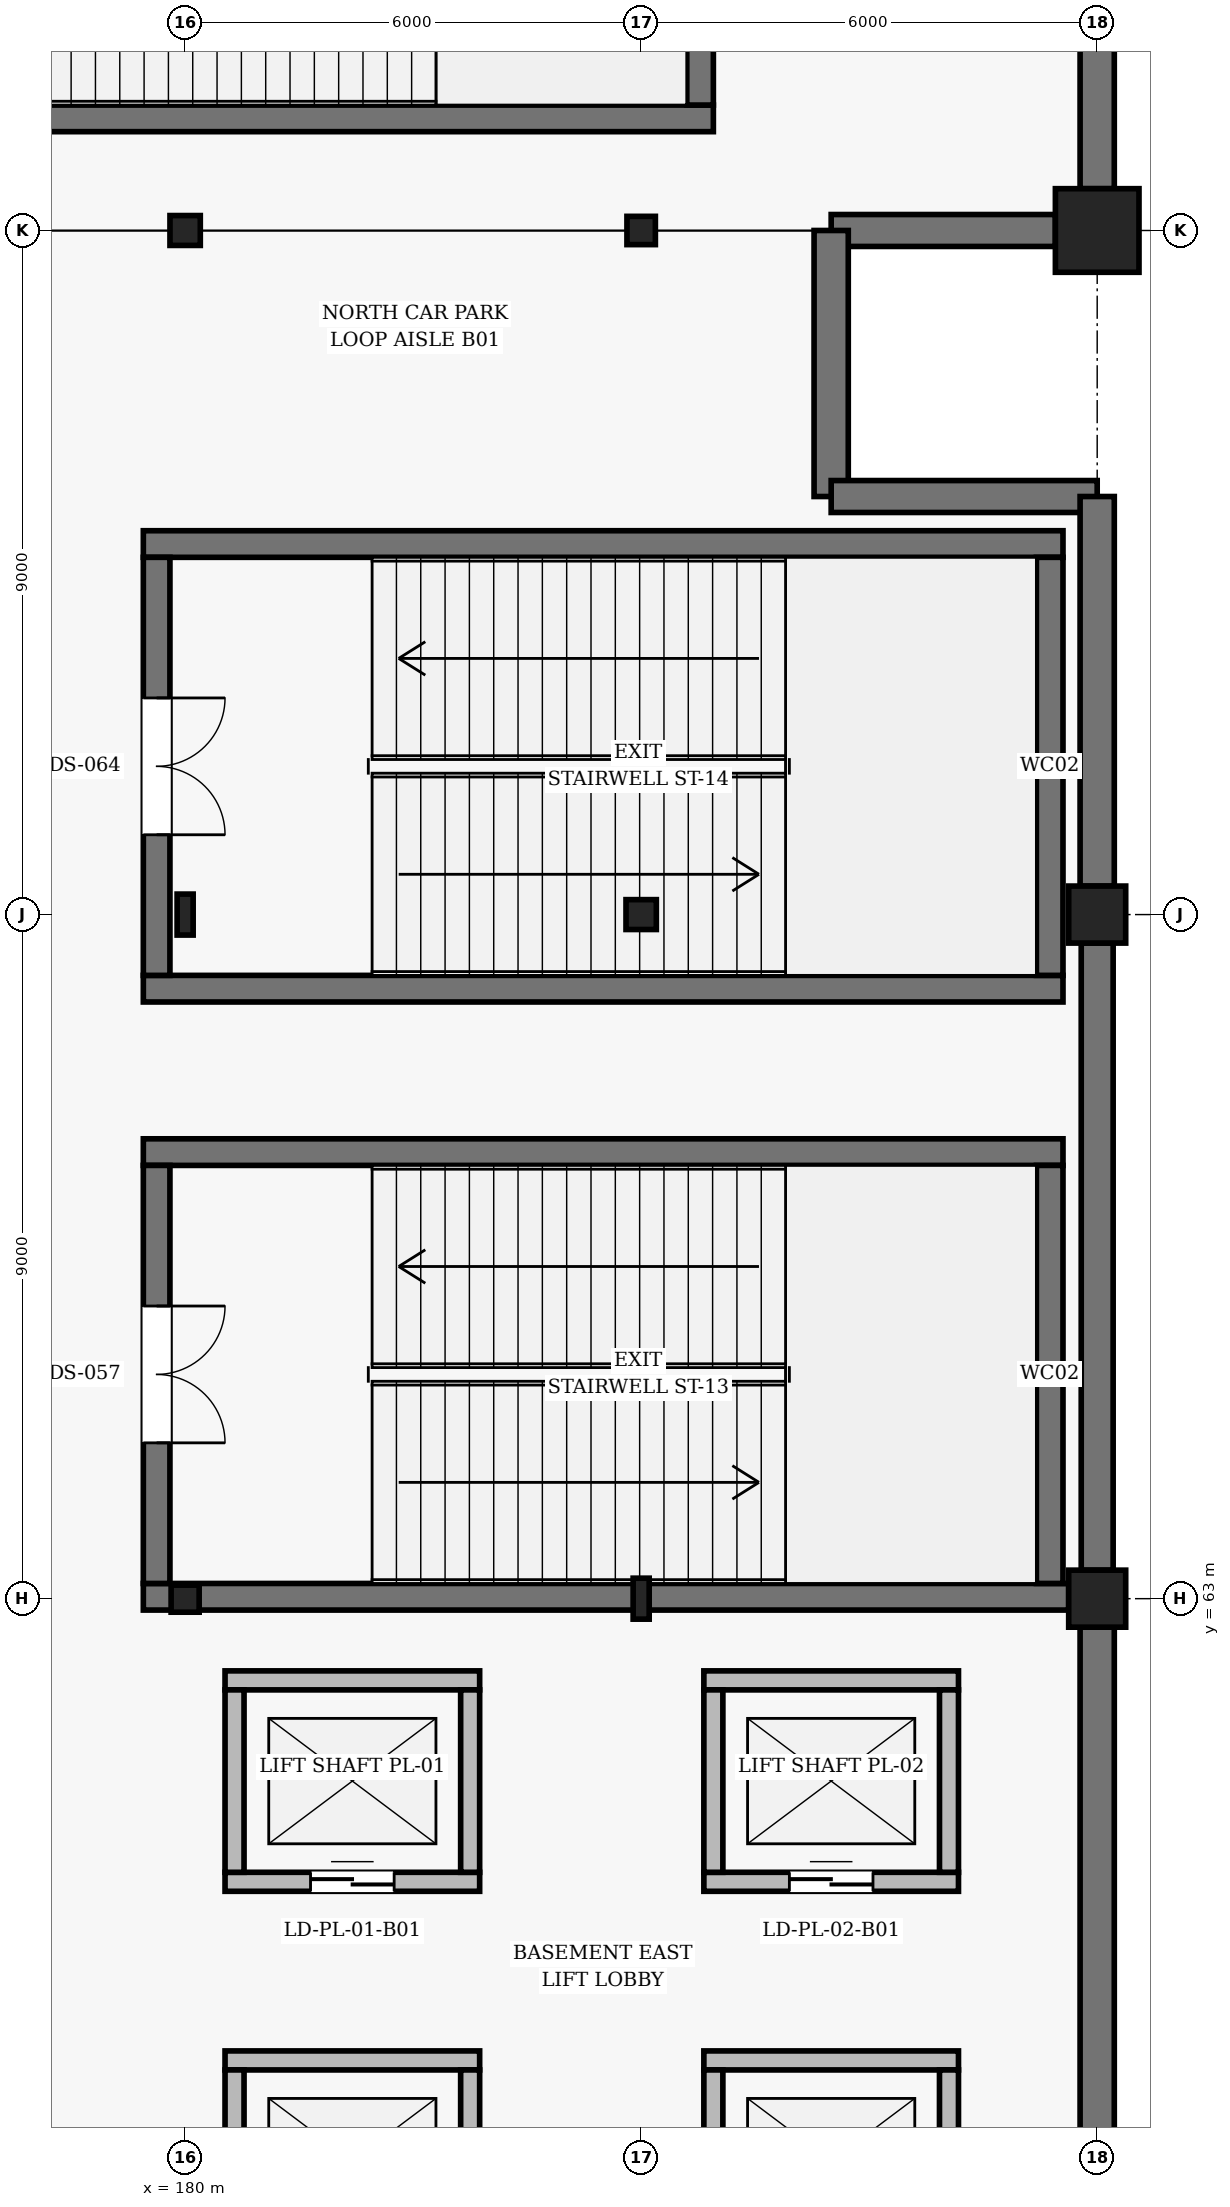
"""IFC4 building model, lengths in metres.
Left out: names, types, materials, properties, quantities, classifications, styles, units other than length and angle.
Written with IfcOpenShell. Run it as: python <this file> out.ifc"""

import sys

from ifc_helpers import new_model, si_unit, direction, frame, frame_2d, origin, origin_2d, place, context, subcontext, project, spatial, rectangle, i_section, extrude, element, fill, save


model = new_model("IFC4")
c1 = context("Model", 3, precision=1e-05, world=origin(), true_north=direction((0.0, 1.0)))
c2 = subcontext(c1, "Body", "Model", "MODEL_VIEW")
j1 = project(units=[si_unit("LENGTHUNIT", "METRE"), si_unit("PLANEANGLEUNIT", "RADIAN")], contexts=[c1])
p1 = place(None, origin())
s1 = spatial("IfcSite", under=j1, at=p1, CompositionType="ELEMENT")
p2 = place(p1, origin())
s2 = spatial("IfcBuilding", under=s1, at=p2, CompositionType="ELEMENT")
p3 = place(p2, frame((0.0, 0.0, -5.4)))
s3 = spatial("IfcBuildingStorey", under=s2, at=p3, CompositionType="ELEMENT", Elevation=-5.4)
p4 = place(p3, frame((180.0, 63.0, 0.0), z_axis=(0.0, 0.0, 1.0), x_axis=(1.0, 0.0, 0.0)))
e1 = element("IfcColumn", 1, at=p4, inside=s3, PredefinedType="COLUMN", context=c2, shape_type="SweptSolid", body=[
    extrude(i_section(OverallWidth=0.369, OverallDepth=0.356, WebThickness=0.011, FlangeThickness=0.018, FilletRadius=0.015, at=origin_2d()), origin(), (0.0, 0.0, 1.0), 5.4),
])
p5 = place(p3, frame((180.0, 72.0, 0.0), z_axis=(0.0, 0.0, 1.0), x_axis=(1.0, 0.0, 0.0)))
e2 = element("IfcColumn", 2, at=p5, inside=s3, PredefinedType="COLUMN", context=c2, shape_type="SweptSolid", body=[
    extrude(i_section(OverallWidth=0.211, OverallDepth=0.539, WebThickness=0.012, FlangeThickness=0.019, FilletRadius=0.014, at=origin_2d()), origin(), (0.0, 0.0, 1.0), 5.4),
])
p6 = place(p3, frame((180.0, 81.0, 0.0), z_axis=(0.0, 0.0, 1.0), x_axis=(1.0, 0.0, 0.0)))
e3 = element("IfcColumn", 3, at=p6, inside=s3, PredefinedType="COLUMN", context=c2, shape_type="SweptSolid", body=[
    extrude(i_section(OverallWidth=0.399, OverallDepth=0.393, WebThickness=0.023, FlangeThickness=0.037, FilletRadius=0.018, at=origin_2d()), origin(), (0.0, 0.0, 1.0), 5.4),
])
p7 = place(p3, frame((186.0, 63.0, 0.0), z_axis=(0.0, 0.0, 1.0), x_axis=(1.0, 0.0, 0.0)))
e4 = element("IfcColumn", 4, at=p7, inside=s3, PredefinedType="COLUMN", context=c2, shape_type="SweptSolid", body=[
    extrude(i_section(OverallWidth=0.211, OverallDepth=0.539, WebThickness=0.012, FlangeThickness=0.019, FilletRadius=0.014, at=origin_2d()), origin(), (0.0, 0.0, 1.0), 5.4),
])
p8 = place(p3, frame((186.0, 72.0, 0.0), z_axis=(0.0, 0.0, 1.0), x_axis=(1.0, 0.0, 0.0)))
e5 = element("IfcColumn", 5, at=p8, inside=s3, PredefinedType="COLUMN", context=c2, shape_type="SweptSolid", body=[
    extrude(i_section(OverallWidth=0.399, OverallDepth=0.393, WebThickness=0.023, FlangeThickness=0.037, FilletRadius=0.018, at=origin_2d()), origin(), (0.0, 0.0, 1.0), 5.4),
])
p9 = place(p3, frame((186.0, 81.0, 0.0), z_axis=(0.0, 0.0, 1.0), x_axis=(1.0, 0.0, 0.0)))
e6 = element("IfcColumn", 6, at=p9, inside=s3, PredefinedType="COLUMN", context=c2, shape_type="SweptSolid", body=[
    extrude(i_section(OverallWidth=0.374, OverallDepth=0.372, WebThickness=0.016, FlangeThickness=0.026, FilletRadius=0.016, at=origin_2d()), origin(), (0.0, 0.0, 1.0), 5.4),
])
for number, where, z_axis, x_axis in (
    (7, (192.0, 63.0, 0.0), (0.0, 0.0, 1.0), (1.0, 0.0, 0.0)),
    (8, (192.0, 72.0, 0.0), (0.0, 0.0, 1.0), (1.0, 0.0, 0.0)),
):
    element("IfcColumn", number, at=place(p3, frame(where, z_axis=z_axis, x_axis=x_axis)), inside=s3, PredefinedType="COLUMN", context=c2, shape_type="SweptSolid", body=[
        extrude(rectangle(XDim=0.75, YDim=0.75, at=origin_2d()), origin(), (0.0, 0.0, 1.0), 5.4),
    ])
p10 = place(p3, frame((192.0, 81.0, 0.0), z_axis=(0.0, 0.0, 1.0), x_axis=(1.0, 0.0, 0.0)))
e9 = element("IfcColumn", 9, at=p10, inside=s3, PredefinedType="COLUMN", context=c2, shape_type="SweptSolid", body=[
    extrude(rectangle(XDim=1.1, YDim=1.1, at=origin_2d()), origin(), (0.0, 0.0, 1.0), 5.4),
])
p11 = place(p3, frame((192.0, 89.625, 0.0), z_axis=(0.0, 0.0, 1.0), x_axis=(0.0, -1.0, 0.0)))
e10 = element("IfcWall", 10, at=p11, inside=s3, PredefinedType="USERDEFINED", context=c2, shape_type="SweptSolid", body=[
    extrude(rectangle(XDim=8.075, YDim=0.45, at=frame_2d((4.038, 0.0))), origin(), (0.0, 0.0, 1.0), 4.566),
])
p12 = place(p3, frame((191.45, 81.0, 0.0), z_axis=(0.0, 0.0, 1.0), x_axis=(-1.0, 0.0, 0.0)))
e11 = element("IfcWall", 11, at=p12, inside=s3, PredefinedType="USERDEFINED", context=c2, shape_type="SweptSolid", body=[
    extrude(rectangle(XDim=2.95, YDim=0.42, at=frame_2d((1.475, 0.0))), origin(), (0.0, 0.0, 1.0), 4.332),
])
p13 = place(p3, frame((188.5, 81.0, 0.0), z_axis=(0.0, 0.0, 1.0), x_axis=(0.0, -1.0, 0.0)))
e12 = element("IfcWall", 12, at=p13, inside=s3, PredefinedType="USERDEFINED", context=c2, shape_type="SweptSolid", body=[
    extrude(rectangle(XDim=3.5, YDim=0.45, at=frame_2d((1.75, 0.0))), origin(), (0.0, 0.0, 1.0), 5.05),
])
p14 = place(p3, frame((188.5, 77.5, 0.0), z_axis=(0.0, 0.0, 1.0), x_axis=(1.0, 0.0, 0.0)))
e13 = element("IfcWall", 13, at=p14, inside=s3, PredefinedType="USERDEFINED", context=c2, shape_type="SweptSolid", body=[
    extrude(rectangle(XDim=3.5, YDim=0.42, at=frame_2d((1.75, 0.0))), origin(), (0.0, 0.0, 1.0), 5.05),
])
p15 = place(p3, frame((192.0, 77.5, 0.0), z_axis=(0.0, 0.0, 1.0), x_axis=(0.0, -1.0, 0.0)))
e14 = element("IfcWall", 14, at=p15, inside=s3, PredefinedType="USERDEFINED", context=c2, shape_type="SweptSolid", body=[
    extrude(rectangle(XDim=5.125, YDim=0.45, at=frame_2d((2.562, 0.0))), origin(), (0.0, 0.0, 1.0), 4.825),
])
p16 = place(p3, frame((192.0, 71.625, 0.0), z_axis=(0.0, 0.0, 1.0), x_axis=(0.0, -1.0, 0.0)))
e15 = element("IfcWall", 15, at=p16, inside=s3, PredefinedType="USERDEFINED", context=c2, shape_type="SweptSolid", body=[
    extrude(rectangle(XDim=8.25, YDim=0.42, at=frame_2d((4.125, 0.0))), origin(), (0.0, 0.0, 1.0), 4.659),
])
p17 = place(p3, frame((192.0, 62.625, 0.0), z_axis=(0.0, 0.0, 1.0), x_axis=(0.0, -1.0, 0.0)))
e16 = element("IfcWall", 16, at=p17, inside=s3, PredefinedType="USERDEFINED", context=c2, shape_type="SweptSolid", body=[
    extrude(rectangle(XDim=8.25, YDim=0.45, at=frame_2d((4.125, 0.0))), origin(), (0.0, 0.0, 1.0), 4.586),
])
p18 = place(p3, frame((179.45, 63.025, 0.0), z_axis=(0.0, 0.0, 1.0), x_axis=(1.0, 0.0, 0.0)))
e17 = element("IfcWall", 17, at=p18, inside=s3, PredefinedType="SHEAR", context=c2, shape_type="SweptSolid", body=[
    extrude(rectangle(XDim=12.175, YDim=0.35, at=frame_2d((6.087, 0.0))), origin(), (0.0, 0.0, 1.0), 5.14),
])
p19 = place(p3, frame((191.55, 68.875, 0.0), z_axis=(0.0, 0.0, 1.0), x_axis=(-1.0, 0.0, 0.0)))
e18 = element("IfcWall", 18, at=p19, inside=s3, PredefinedType="SHEAR", context=c2, shape_type="SweptSolid", body=[
    extrude(rectangle(XDim=12.1, YDim=0.35, at=frame_2d((6.05, 0.0))), origin(), (0.0, 0.0, 1.0), 5.14),
])
p20 = place(p3, frame((179.625, 68.7, 0.0), z_axis=(0.0, 0.0, 1.0), x_axis=(0.0, -1.0, 0.0)))
e19 = element("IfcWall", 19, at=p20, inside=s3, PredefinedType="SHEAR", context=c2, shape_type="SweptSolid", body=[
    extrude(rectangle(XDim=5.5, YDim=0.35, at=frame_2d((2.75, 0.0))), origin(), (0.0, 0.0, 1.0), 5.14),
])
p21 = place(p20, frame((1.85, 0.0, 0.0)))
e20 = element("IfcOpeningElement", 20, at=p21, cuts=e19, PredefinedType="OPENING", context=c2, shape_type="SweptSolid", body=[
    extrude(rectangle(XDim=1.8, YDim=2.2, at=frame_2d((0.9, 1.1))), frame((0.0, 0.185, 0.0), z_axis=(0.0, -1.0, 0.0), x_axis=(1.0, 0.0, 0.0)), (0.0, 0.0, 1.0), 0.37),
])
p22 = place(p3, frame((191.375, 63.2, 0.0), z_axis=(0.0, 0.0, 1.0), x_axis=(0.0, 1.0, 0.0)))
e21 = element("IfcWall", 21, at=p22, inside=s3, PredefinedType="SHEAR", context=c2, shape_type="SweptSolid", body=[
    extrude(rectangle(XDim=5.5, YDim=0.35, at=frame_2d((2.75, 0.0))), origin(), (0.0, 0.0, 1.0), 5.14),
])
for number, where, z_axis, x_axis in (
    (22, (179.45, 71.025, 0.0), (0.0, 0.0, 1.0), (1.0, 0.0, 0.0)),
    (23, (191.55, 76.875, 0.0), (0.0, 0.0, 1.0), (-1.0, 0.0, 0.0)),
):
    element("IfcWall", number, at=place(p3, frame(where, z_axis=z_axis, x_axis=x_axis)), inside=s3, PredefinedType="SHEAR", context=c2, shape_type="SweptSolid", body=[
        extrude(rectangle(XDim=12.1, YDim=0.35, at=frame_2d((6.05, 0.0))), origin(), (0.0, 0.0, 1.0), 5.14),
    ])
p23 = place(p3, frame((179.625, 76.7, 0.0), z_axis=(0.0, 0.0, 1.0), x_axis=(0.0, -1.0, 0.0)))
e24 = element("IfcWall", 24, at=p23, inside=s3, PredefinedType="SHEAR", context=c2, shape_type="SweptSolid", body=[
    extrude(rectangle(XDim=5.5, YDim=0.35, at=frame_2d((2.75, 0.0))), origin(), (0.0, 0.0, 1.0), 5.14),
])
p24 = place(p23, frame((1.85, 0.0, 0.0)))
e25 = element("IfcOpeningElement", 25, at=p24, cuts=e24, PredefinedType="OPENING", context=c2, shape_type="SweptSolid", body=[
    extrude(rectangle(XDim=1.8, YDim=2.2, at=frame_2d((0.9, 1.1))), frame((0.0, 0.185, 0.0), z_axis=(0.0, -1.0, 0.0), x_axis=(1.0, 0.0, 0.0)), (0.0, 0.0, 1.0), 0.37),
])
p25 = place(p3, frame((191.375, 71.2, 0.0), z_axis=(0.0, 0.0, 1.0), x_axis=(0.0, 1.0, 0.0)))
e26 = element("IfcWall", 26, at=p25, inside=s3, PredefinedType="SHEAR", context=c2, shape_type="SweptSolid", body=[
    extrude(rectangle(XDim=5.5, YDim=0.35, at=frame_2d((2.75, 0.0))), origin(), (0.0, 0.0, 1.0), 5.14),
])
p26 = place(p3, frame((174.85, 82.475, 0.0), z_axis=(0.0, 0.0, 1.0), x_axis=(1.0, 0.0, 0.0)))
e27 = element("IfcWall", 27, at=p26, inside=s3, PredefinedType="SHEAR", context=c2, shape_type="SweptSolid", body=[
    extrude(rectangle(XDim=12.1, YDim=0.35, at=frame_2d((6.05, 0.0))), origin(), (0.0, 0.0, 1.0), 5.12),
])
p27 = place(p3, frame((186.775, 82.65, 0.0), z_axis=(0.0, 0.0, 1.0), x_axis=(0.0, 1.0, 0.0)))
e28 = element("IfcWall", 28, at=p27, inside=s3, PredefinedType="SHEAR", context=c2, shape_type="SweptSolid", body=[
    extrude(rectangle(XDim=5.5, YDim=0.35, at=frame_2d((2.75, 0.0))), origin(), (0.0, 0.0, 1.0), 5.12),
])
p28 = place(p3, frame((180.525, 59.275, 0.0), z_axis=(0.0, 0.0, 1.0), x_axis=(1.0, 0.0, 0.0)))
e29 = element("IfcWall", 29, at=p28, inside=s3, PredefinedType="SOLIDWALL", context=c2, shape_type="SweptSolid", body=[
    extrude(rectangle(XDim=3.35, YDim=0.25, at=frame_2d((1.675, 0.0))), origin(), (0.0, 0.0, 1.0), 5.1),
])
p29 = place(p28, frame((1.125, 0.0, 0.0)))
e30 = element("IfcOpeningElement", 30, at=p29, cuts=e29, PredefinedType="OPENING", context=c2, shape_type="SweptSolid", body=[
    extrude(rectangle(XDim=1.1, YDim=2.2, at=frame_2d((0.55, 1.1))), frame((0.0, 0.135, 0.0), z_axis=(0.0, -1.0, 0.0), x_axis=(1.0, 0.0, 0.0)), (0.0, 0.0, 1.0), 0.27),
])
p30 = place(p3, frame((183.875, 61.925, 0.0), z_axis=(0.0, 0.0, 1.0), x_axis=(-1.0, 0.0, 0.0)))
e31 = element("IfcWall", 31, at=p30, inside=s3, PredefinedType="SOLIDWALL", context=c2, shape_type="SweptSolid", body=[
    extrude(rectangle(XDim=3.35, YDim=0.25, at=frame_2d((1.675, 0.0))), origin(), (0.0, 0.0, 1.0), 5.1),
])
for number, where, z_axis, x_axis in (
    (32, (180.65, 61.8, 0.0), (0.0, 0.0, 1.0), (0.0, -1.0, 0.0)),
    (33, (183.75, 59.4, 0.0), (0.0, 0.0, 1.0), (0.0, 1.0, 0.0)),
):
    element("IfcWall", number, at=place(p3, frame(where, z_axis=z_axis, x_axis=x_axis)), inside=s3, PredefinedType="SOLIDWALL", context=c2, shape_type="SweptSolid", body=[
        extrude(rectangle(XDim=2.4, YDim=0.25, at=frame_2d((1.2, 0.0))), origin(), (0.0, 0.0, 1.0), 5.1),
    ])
p31 = place(p3, frame((186.825, 59.275, 0.0), z_axis=(0.0, 0.0, 1.0), x_axis=(1.0, 0.0, 0.0)))
e34 = element("IfcWall", 34, at=p31, inside=s3, PredefinedType="SOLIDWALL", context=c2, shape_type="SweptSolid", body=[
    extrude(rectangle(XDim=3.35, YDim=0.25, at=frame_2d((1.675, 0.0))), origin(), (0.0, 0.0, 1.0), 5.1),
])
p32 = place(p31, frame((1.125, 0.0, 0.0)))
e35 = element("IfcOpeningElement", 35, at=p32, cuts=e34, PredefinedType="OPENING", context=c2, shape_type="SweptSolid", body=[
    extrude(rectangle(XDim=1.1, YDim=2.2, at=frame_2d((0.55, 1.1))), frame((0.0, 0.135, 0.0), z_axis=(0.0, -1.0, 0.0), x_axis=(1.0, 0.0, 0.0)), (0.0, 0.0, 1.0), 0.27),
])
p33 = place(p3, frame((190.175, 61.925, 0.0), z_axis=(0.0, 0.0, 1.0), x_axis=(-1.0, 0.0, 0.0)))
e36 = element("IfcWall", 36, at=p33, inside=s3, PredefinedType="SOLIDWALL", context=c2, shape_type="SweptSolid", body=[
    extrude(rectangle(XDim=3.35, YDim=0.25, at=frame_2d((1.675, 0.0))), origin(), (0.0, 0.0, 1.0), 5.1),
])
for number, where, z_axis, x_axis in (
    (37, (186.95, 61.8, 0.0), (0.0, 0.0, 1.0), (0.0, -1.0, 0.0)),
    (38, (190.05, 59.4, 0.0), (0.0, 0.0, 1.0), (0.0, 1.0, 0.0)),
):
    element("IfcWall", number, at=place(p3, frame(where, z_axis=z_axis, x_axis=x_axis)), inside=s3, PredefinedType="SOLIDWALL", context=c2, shape_type="SweptSolid", body=[
        extrude(rectangle(XDim=2.4, YDim=0.25, at=frame_2d((1.2, 0.0))), origin(), (0.0, 0.0, 1.0), 5.1),
    ])
p34 = place(p3, frame((183.875, 56.925, 0.0), z_axis=(0.0, 0.0, 1.0), x_axis=(-1.0, 0.0, 0.0)))
e39 = element("IfcWall", 39, at=p34, inside=s3, PredefinedType="SOLIDWALL", context=c2, shape_type="SweptSolid", body=[
    extrude(rectangle(XDim=3.35, YDim=0.25, at=frame_2d((1.675, 0.0))), origin(), (0.0, 0.0, 1.0), 4.718),
])
for number, where, z_axis, x_axis in (
    (40, (180.65, 56.8, 0.0), (0.0, 0.0, 1.0), (0.0, -1.0, 0.0)),
    (41, (183.75, 54.4, 0.0), (0.0, 0.0, 1.0), (0.0, 1.0, 0.0)),
):
    element("IfcWall", number, at=place(p3, frame(where, z_axis=z_axis, x_axis=x_axis)), inside=s3, PredefinedType="SOLIDWALL", context=c2, shape_type="SweptSolid", body=[
        extrude(rectangle(XDim=2.4, YDim=0.25, at=frame_2d((1.2, 0.0))), origin(), (0.0, 0.0, 1.0), 4.421),
    ])
p35 = place(p3, frame((190.175, 56.925, 0.0), z_axis=(0.0, 0.0, 1.0), x_axis=(-1.0, 0.0, 0.0)))
e42 = element("IfcWall", 42, at=p35, inside=s3, PredefinedType="SOLIDWALL", context=c2, shape_type="SweptSolid", body=[
    extrude(rectangle(XDim=3.35, YDim=0.25, at=frame_2d((1.675, 0.0))), origin(), (0.0, 0.0, 1.0), 4.817),
])
for number, where, z_axis, x_axis in (
    (43, (186.95, 56.8, 0.0), (0.0, 0.0, 1.0), (0.0, -1.0, 0.0)),
    (44, (190.05, 54.4, 0.0), (0.0, 0.0, 1.0), (0.0, 1.0, 0.0)),
):
    element("IfcWall", number, at=place(p3, frame(where, z_axis=z_axis, x_axis=x_axis)), inside=s3, PredefinedType="SOLIDWALL", context=c2, shape_type="SweptSolid", body=[
        extrude(rectangle(XDim=2.4, YDim=0.25, at=frame_2d((1.2, 0.0))), origin(), (0.0, 0.0, 1.0), 4.494),
    ])
p36 = place(p21, origin())
e45 = element("IfcDoor", 45, at=p36, inside=s3, OperationType="DOUBLE_DOOR_SINGLE_SWING", PredefinedType="DOOR", context=c2, shape_type="SweptSolid", body=[
    extrude(rectangle(XDim=1.8, YDim=2.2, at=frame_2d((0.9, 1.1))), frame((0.0, 0.025, 0.0), z_axis=(0.0, -1.0, 0.0), x_axis=(1.0, 0.0, 0.0)), (0.0, 0.0, 1.0), 0.05),
])
fill(e20, e45)
p37 = place(p24, origin())
e46 = element("IfcDoor", 46, at=p37, inside=s3, OperationType="DOUBLE_DOOR_SINGLE_SWING", PredefinedType="DOOR", context=c2, shape_type="SweptSolid", body=[
    extrude(rectangle(XDim=1.8, YDim=2.2, at=frame_2d((0.9, 1.1))), frame((0.0, 0.025, 0.0), z_axis=(0.0, -1.0, 0.0), x_axis=(1.0, 0.0, 0.0)), (0.0, 0.0, 1.0), 0.05),
])
fill(e25, e46)
p38 = place(p29, origin())
e47 = element("IfcDoor", 47, at=p38, inside=s3, OperationType="DOUBLE_DOOR_SLIDING", PredefinedType="DOOR", context=c2, shape_type="SweptSolid", body=[
    extrude(rectangle(XDim=1.1, YDim=2.2, at=frame_2d((0.55, 1.1))), frame((0.0, 0.025, 0.0), z_axis=(0.0, -1.0, 0.0), x_axis=(1.0, 0.0, 0.0)), (0.0, 0.0, 1.0), 0.05),
])
fill(e30, e47)
p39 = place(p32, origin())
e48 = element("IfcDoor", 48, at=p39, inside=s3, OperationType="DOUBLE_DOOR_SLIDING", PredefinedType="DOOR", context=c2, shape_type="SweptSolid", body=[
    extrude(rectangle(XDim=1.1, YDim=2.2, at=frame_2d((0.55, 1.1))), frame((0.0, 0.025, 0.0), z_axis=(0.0, -1.0, 0.0), x_axis=(1.0, 0.0, 0.0)), (0.0, 0.0, 1.0), 0.05),
])
fill(e35, e48)
save(model, sys.argv[1])
